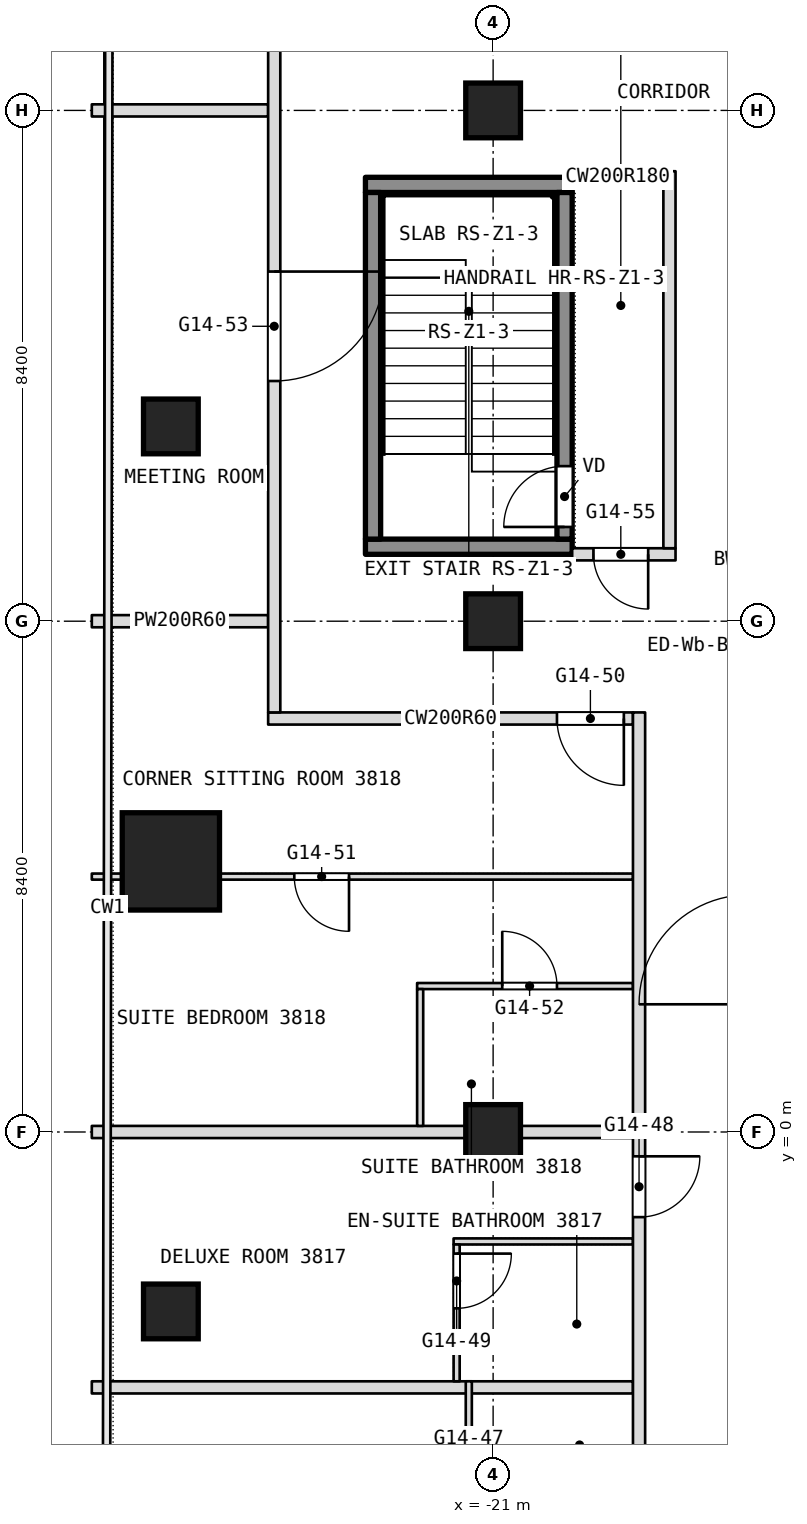
"""IFC4 building model, lengths in metres.
Left out: names, types, materials, properties, quantities, classifications, styles, units other than length and angle.
Written with IfcOpenShell. Run it as: python <this file> out.ifc"""

import sys

from ifc_helpers import new_model, si_unit, direction, frame, frame_2d, origin, origin_2d, place, context, subcontext, project, spatial, rectangle, extrude, element, fill, save


model = new_model("IFC4")
c1 = context("Model", 3, precision=1e-05, world=origin(), true_north=direction((0.0, 1.0)))
c2 = subcontext(c1, "Body", "Model", "MODEL_VIEW")
j1 = project(units=[si_unit("LENGTHUNIT", "METRE"), si_unit("PLANEANGLEUNIT", "RADIAN")], contexts=[c1])
p1 = place(None, origin())
s1 = spatial("IfcSite", under=j1, at=p1, CompositionType="ELEMENT")
p2 = place(p1, origin())
s2 = spatial("IfcBuilding", under=s1, at=p2, CompositionType="ELEMENT")
p3 = place(p2, frame((0.0, 0.0, 162.5)))
s3 = spatial("IfcBuildingStorey", under=s2, at=p3, CompositionType="ELEMENT", Elevation=162.5)
p4 = place(p3, frame((-26.3, 4.45, 0.0), z_axis=(0.0, 0.0, 1.0), x_axis=(1.0, 0.0, 0.0)))
e1 = element("IfcColumn", 1, at=p4, inside=s3, PredefinedType="COLUMN", context=c2, shape_type="SweptSolid", body=[
    extrude(rectangle(XDim=1.6, YDim=1.6, at=origin_2d()), origin(), (0.0, 0.0, 1.0), 3.6),
])
for number, where, z_axis, x_axis in (
    (2, (-21.0, 0.0, 0.0), (0.0, 0.0, 1.0), (1.0, 0.0, 0.0)),
    (3, (-21.0, 8.4, 0.0), (0.0, 0.0, 1.0), (1.0, 0.0, 0.0)),
    (4, (-21.0, 16.8, 0.0), (0.0, 0.0, 1.0), (1.0, 0.0, 0.0)),
    (5, (-26.3, -2.951, 0.0), (0.0, 0.0, 1.0), (1.0, 0.0, 0.0)),
    (6, (-26.3, 11.603, 0.0), (0.0, 0.0, 1.0), (1.0, 0.0, 0.0)),
):
    element("IfcColumn", number, at=place(p3, frame(where, z_axis=z_axis, x_axis=x_axis)), inside=s3, PredefinedType="COLUMN", context=c2, shape_type="SweptSolid", body=[
        extrude(rectangle(XDim=0.9, YDim=0.9, at=origin_2d()), origin(), (0.0, 0.0, 1.0), 3.6),
    ])
p5 = place(p3, frame((-27.6, -4.2, 0.0), z_axis=(0.0, 0.0, 1.0), x_axis=(1.0, 0.0, 0.0)))
e7 = element("IfcWall", 7, at=p5, inside=s3, PredefinedType="PARTITIONING", context=c2, shape_type="SweptSolid", body=[
    extrude(rectangle(XDim=8.9, YDim=0.2, at=frame_2d((4.45, 0.0))), origin(), (0.0, 0.0, 1.0), 3.34),
])
p6 = place(p3, frame((-21.65, -1.8, 0.0), z_axis=(0.0, 0.0, 1.0), x_axis=(1.0, 0.0, 0.0)))
e8 = element("IfcWall", 8, at=p6, inside=s3, PredefinedType="PARTITIONING", context=c2, shape_type="SweptSolid", body=[
    extrude(rectangle(XDim=2.95, YDim=0.1, at=frame_2d((1.475, 0.0))), origin(), (0.0, 0.0, 1.0), 3.34),
])
p7 = place(p3, frame((-27.6, 0.0, 0.0), z_axis=(0.0, 0.0, 1.0), x_axis=(1.0, 0.0, 0.0)))
e9 = element("IfcWall", 9, at=p7, inside=s3, PredefinedType="PARTITIONING", context=c2, shape_type="SweptSolid", body=[
    extrude(rectangle(XDim=8.9, YDim=0.2, at=frame_2d((4.45, 0.0))), origin(), (0.0, 0.0, 1.0), 2.89),
])
p8 = place(p3, frame((-22.25, 2.4, 0.0), z_axis=(0.0, 0.0, 1.0), x_axis=(1.0, 0.0, 0.0)))
e10 = element("IfcWall", 10, at=p8, inside=s3, PredefinedType="PARTITIONING", context=c2, shape_type="SweptSolid", body=[
    extrude(rectangle(XDim=3.55, YDim=0.1, at=frame_2d((1.775, 0.0))), origin(), (0.0, 0.0, 1.0), 3.34),
])
p9 = place(p8, frame((1.4, 0.0, 0.0)))
e11 = element("IfcOpeningElement", 11, at=p9, cuts=e10, PredefinedType="OPENING", context=c2, shape_type="SweptSolid", body=[
    extrude(rectangle(XDim=0.9, YDim=2.1, at=frame_2d((0.45, 1.05))), frame((0.0, 0.05, 0.0), z_axis=(0.0, -1.0, 0.0), x_axis=(1.0, 0.0, 0.0)), (0.0, 0.0, 1.0), 0.1),
])
p10 = place(p3, frame((-27.6, 4.2, 0.0), z_axis=(0.0, 0.0, 1.0), x_axis=(1.0, 0.0, 0.0)))
e12 = element("IfcWall", 12, at=p10, inside=s3, PredefinedType="PARTITIONING", context=c2, shape_type="SweptSolid", body=[
    extrude(rectangle(XDim=0.5, YDim=0.1, at=frame_2d((0.25, 0.0))), origin(), (0.0, 0.0, 1.0), 3.34),
])
p11 = place(p3, frame((-25.5, 4.2, 0.0), z_axis=(0.0, 0.0, 1.0), x_axis=(1.0, 0.0, 0.0)))
e13 = element("IfcWall", 13, at=p11, inside=s3, PredefinedType="PARTITIONING", context=c2, shape_type="SweptSolid", body=[
    extrude(rectangle(XDim=6.8, YDim=0.1, at=frame_2d((3.4, 0.0))), origin(), (0.0, 0.0, 1.0), 3.34),
])
p12 = place(p11, frame((1.23, 0.0, 0.0)))
e14 = element("IfcOpeningElement", 14, at=p12, cuts=e13, PredefinedType="OPENING", context=c2, shape_type="SweptSolid", body=[
    extrude(rectangle(XDim=0.9, YDim=2.1, at=frame_2d((0.45, 1.05))), frame((0.0, 0.05, 0.0), z_axis=(0.0, -1.0, 0.0), x_axis=(1.0, 0.0, 0.0)), (0.0, 0.0, 1.0), 0.1),
])
p13 = place(p3, frame((-24.7, 6.8, 0.0), z_axis=(0.0, 0.0, 1.0), x_axis=(1.0, 0.0, 0.0)))
e15 = element("IfcWall", 15, at=p13, inside=s3, PredefinedType="PARTITIONING", context=c2, shape_type="SweptSolid", body=[
    extrude(rectangle(XDim=6.0, YDim=0.2, at=frame_2d((3.0, 0.0))), origin(), (0.0, 0.0, 1.0), 3.34),
])
p14 = place(p13, frame((4.75, 0.0, 0.0)))
e16 = element("IfcOpeningElement", 16, at=p14, cuts=e15, PredefinedType="OPENING", context=c2, shape_type="SweptSolid", body=[
    extrude(rectangle(XDim=1.1, YDim=2.1, at=frame_2d((0.55, 1.05))), frame((0.0, 0.1, 0.0), z_axis=(0.0, -1.0, 0.0), x_axis=(1.0, 0.0, 0.0)), (0.0, 0.0, 1.0), 0.2),
])
p15 = place(p3, frame((-27.6, 8.4, 0.0), z_axis=(0.0, 0.0, 1.0), x_axis=(1.0, 0.0, 0.0)))
e17 = element("IfcWall", 17, at=p15, inside=s3, PredefinedType="PARTITIONING", context=c2, shape_type="SweptSolid", body=[
    extrude(rectangle(XDim=2.9, YDim=0.2, at=frame_2d((1.45, 0.0))), origin(), (0.0, 0.0, 1.0), 2.89),
])
p16 = place(p3, frame((-19.7, 9.5, 0.0), z_axis=(0.0, 0.0, 1.0), x_axis=(1.0, 0.0, 0.0)))
e18 = element("IfcWall", 18, at=p16, inside=s3, PredefinedType="PARTITIONING", context=c2, shape_type="SweptSolid", body=[
    extrude(rectangle(XDim=1.7, YDim=0.2, at=frame_2d((0.85, 0.0))), origin(), (0.0, 0.0, 1.0), 3.34),
])
p17 = place(p16, frame((0.35, 0.0, 0.0)))
e19 = element("IfcOpeningElement", 19, at=p17, cuts=e18, PredefinedType="OPENING", context=c2, shape_type="SweptSolid", body=[
    extrude(rectangle(XDim=0.9, YDim=2.1, at=frame_2d((0.45, 1.05))), frame((0.0, 0.1, 0.0), z_axis=(0.0, -1.0, 0.0), x_axis=(1.0, 0.0, 0.0)), (0.0, 0.0, 1.0), 0.2),
])
p18 = place(p3, frame((-19.7, 15.7, 0.0), z_axis=(0.0, 0.0, 1.0), x_axis=(1.0, 0.0, 0.0)))
e20 = element("IfcWall", 20, at=p18, inside=s3, PredefinedType="PARTITIONING", context=c2, shape_type="SweptSolid", body=[
    extrude(rectangle(XDim=1.5, YDim=0.2, at=frame_2d((0.75, 0.0))), origin(), (0.0, 0.0, 1.0), 3.34),
])
p19 = place(p3, frame((-27.6, 16.8, 0.0), z_axis=(0.0, 0.0, 1.0), x_axis=(1.0, 0.0, 0.0)))
e21 = element("IfcWall", 21, at=p19, inside=s3, PredefinedType="PARTITIONING", context=c2, shape_type="SweptSolid", body=[
    extrude(rectangle(XDim=2.9, YDim=0.2, at=frame_2d((1.45, 0.0))), origin(), (0.0, 0.0, 1.0), 2.89),
])
p20 = place(p3, frame((-18.1, 9.6, 0.0), z_axis=(0.0, 0.0, 1.0), x_axis=(0.0, 1.0, 0.0)))
e22 = element("IfcWall", 22, at=p20, inside=s3, PredefinedType="PARTITIONING", context=c2, shape_type="SweptSolid", body=[
    extrude(rectangle(XDim=6.2, YDim=0.2, at=frame_2d((3.1, 0.0))), origin(), (0.0, 0.0, 1.0), 3.34),
])
p21 = place(p3, frame((-18.6, -21.708, 0.0), z_axis=(0.0, 0.0, 1.0), x_axis=(0.0, 1.0, 0.0)))
e23 = element("IfcWall", 23, at=p21, inside=s3, PredefinedType="PARTITIONING", context=c2, shape_type="SweptSolid", body=[
    extrude(rectangle(XDim=28.608, YDim=0.2, at=frame_2d((14.304, 0.0))), origin(), (0.0, 0.0, 1.0), 3.34),
])
p22 = place(p21, frame((2.204, 0.0, 0.0)))
e24 = element("IfcOpeningElement", 24, at=p22, cuts=e23, PredefinedType="OPENING", context=c2, shape_type="SweptSolid", body=[
    extrude(rectangle(XDim=1.0, YDim=2.1, at=frame_2d((0.5, 1.05))), frame((0.0, 0.1, 0.0), z_axis=(0.0, -1.0, 0.0), x_axis=(1.0, 0.0, 0.0)), (0.0, 0.0, 1.0), 0.2),
])
p23 = place(p21, frame((8.208, 0.0, 0.0)))
e25 = element("IfcOpeningElement", 25, at=p23, cuts=e23, PredefinedType="OPENING", context=c2, shape_type="SweptSolid", body=[
    extrude(rectangle(XDim=1.8, YDim=2.1, at=frame_2d((0.9, 1.05))), frame((0.0, 0.1, 0.0), z_axis=(0.0, -1.0, 0.0), x_axis=(1.0, 0.0, 0.0)), (0.0, 0.0, 1.0), 0.2),
])
p24 = place(p21, frame((13.708, 0.0, 0.0)))
e26 = element("IfcOpeningElement", 26, at=p24, cuts=e23, PredefinedType="OPENING", context=c2, shape_type="SweptSolid", body=[
    extrude(rectangle(XDim=1.0, YDim=2.1, at=frame_2d((0.5, 1.05))), frame((0.0, 0.1, 0.0), z_axis=(0.0, -1.0, 0.0), x_axis=(1.0, 0.0, 0.0)), (0.0, 0.0, 1.0), 0.2),
])
p25 = place(p21, frame((20.308, 0.0, 0.0)))
e27 = element("IfcOpeningElement", 27, at=p25, cuts=e23, PredefinedType="OPENING", context=c2, shape_type="SweptSolid", body=[
    extrude(rectangle(XDim=1.0, YDim=2.1, at=frame_2d((0.5, 1.05))), frame((0.0, 0.1, 0.0), z_axis=(0.0, -1.0, 0.0), x_axis=(1.0, 0.0, 0.0)), (0.0, 0.0, 1.0), 0.2),
])
p26 = place(p3, frame((-21.4, -6.65, 0.0), z_axis=(0.0, 0.0, 1.0), x_axis=(0.0, 1.0, 0.0)))
e28 = element("IfcWall", 28, at=p26, inside=s3, PredefinedType="PARTITIONING", context=c2, shape_type="SweptSolid", body=[
    extrude(rectangle(XDim=2.55, YDim=0.1, at=frame_2d((1.275, 0.0))), origin(), (0.0, 0.0, 1.0), 3.34),
])
p27 = place(p26, frame((0.15, 0.0, 0.0)))
e29 = element("IfcOpeningElement", 29, at=p27, cuts=e28, PredefinedType="OPENING", context=c2, shape_type="SweptSolid", body=[
    extrude(rectangle(XDim=0.9, YDim=2.1, at=frame_2d((0.45, 1.05))), frame((0.0, 0.05, 0.0), z_axis=(0.0, -1.0, 0.0), x_axis=(1.0, 0.0, 0.0)), (0.0, 0.0, 1.0), 0.1),
])
p28 = place(p3, frame((-21.6, -4.1, 0.0), z_axis=(0.0, 0.0, 1.0), x_axis=(0.0, 1.0, 0.0)))
e30 = element("IfcWall", 30, at=p28, inside=s3, PredefinedType="PARTITIONING", context=c2, shape_type="SweptSolid", body=[
    extrude(rectangle(XDim=2.25, YDim=0.1, at=frame_2d((1.125, 0.0))), origin(), (0.0, 0.0, 1.0), 3.34),
])
p29 = place(p28, frame((1.2, 0.0, 0.0)))
e31 = element("IfcOpeningElement", 31, at=p29, cuts=e30, PredefinedType="OPENING", context=c2, shape_type="SweptSolid", body=[
    extrude(rectangle(XDim=0.9, YDim=2.1, at=frame_2d((0.45, 1.05))), frame((0.0, 0.05, 0.0), z_axis=(0.0, -1.0, 0.0), x_axis=(1.0, 0.0, 0.0)), (0.0, 0.0, 1.0), 0.1),
])
p30 = place(p3, frame((-22.2, 0.1, 0.0), z_axis=(0.0, 0.0, 1.0), x_axis=(0.0, 1.0, 0.0)))
e32 = element("IfcWall", 32, at=p30, inside=s3, PredefinedType="PARTITIONING", context=c2, shape_type="SweptSolid", body=[
    extrude(rectangle(XDim=2.25, YDim=0.1, at=frame_2d((1.125, 0.0))), origin(), (0.0, 0.0, 1.0), 3.34),
])
p31 = place(p3, frame((-24.6, 6.9, 0.0), z_axis=(0.0, 0.0, 1.0), x_axis=(0.0, 1.0, 0.0)))
e33 = element("IfcWall", 33, at=p31, inside=s3, PredefinedType="PARTITIONING", context=c2, shape_type="SweptSolid", body=[
    extrude(rectangle(XDim=11.6, YDim=0.2, at=frame_2d((5.8, 0.0))), origin(), (0.0, 0.0, 1.0), 3.34),
])
p32 = place(p31, frame((5.45, 0.0, 0.0)))
e34 = element("IfcOpeningElement", 34, at=p32, cuts=e33, PredefinedType="OPENING", context=c2, shape_type="SweptSolid", body=[
    extrude(rectangle(XDim=1.8, YDim=2.1, at=frame_2d((0.9, 1.05))), frame((0.0, 0.1, 0.0), z_axis=(0.0, -1.0, 0.0), x_axis=(1.0, 0.0, 0.0)), (0.0, 0.0, 1.0), 0.2),
])
for number, where, z_axis, x_axis in (
    (35, (-23.1, 9.625, 0.1), (0.0, 0.0, 1.0), (1.0, 0.0, 0.0)),
    (36, (-23.1, 15.575, 0.1), (0.0, 0.0, 1.0), (1.0, 0.0, 0.0)),
):
    element("IfcWall", number, at=place(p3, frame(where, z_axis=z_axis, x_axis=x_axis)), inside=s3, PredefinedType="SHEAR", context=c2, shape_type="SweptSolid", body=[
        extrude(rectangle(XDim=3.4, YDim=0.25, at=frame_2d((1.7, 0.0))), origin(), (0.0, 0.0, 1.0), 3.6),
    ])
p33 = place(p3, frame((-22.975, 9.75, 0.1), z_axis=(0.0, 0.0, 1.0), x_axis=(0.0, 1.0, 0.0)))
e37 = element("IfcWall", 37, at=p33, inside=s3, PredefinedType="SHEAR", context=c2, shape_type="SweptSolid", body=[
    extrude(rectangle(XDim=5.7, YDim=0.25, at=frame_2d((2.85, 0.0))), origin(), (0.0, 0.0, 1.0), 3.6),
])
p34 = place(p3, frame((-19.825, 9.75, 0.1), z_axis=(0.0, 0.0, 1.0), x_axis=(0.0, 1.0, 0.0)))
e38 = element("IfcWall", 38, at=p34, inside=s3, PredefinedType="SHEAR", context=c2, shape_type="SweptSolid", body=[
    extrude(rectangle(XDim=5.7, YDim=0.25, at=frame_2d((2.85, 0.0))), origin(), (0.0, 0.0, 1.0), 3.6),
])
p35 = place(p34, frame((0.2, 0.0, 0.0)))
e39 = element("IfcOpeningElement", 39, at=p35, cuts=e38, PredefinedType="OPENING", context=c2, shape_type="SweptSolid", body=[
    extrude(rectangle(XDim=1.0, YDim=2.1, at=frame_2d((0.5, 1.05))), frame((0.0, 0.125, 0.0), z_axis=(0.0, -1.0, 0.0), x_axis=(1.0, 0.0, 0.0)), (0.0, 0.0, 1.0), 0.25),
])
p36 = place(p9, origin())
e40 = element("IfcDoor", 40, at=p36, inside=s3, OperationType="SINGLE_SWING_LEFT", PredefinedType="DOOR", context=c2, shape_type="SweptSolid", body=[
    extrude(rectangle(XDim=0.9, YDim=2.1, at=frame_2d((0.45, 1.05))), frame((0.0, 0.025, 0.0), z_axis=(0.0, -1.0, 0.0), x_axis=(1.0, 0.0, 0.0)), (0.0, 0.0, 1.0), 0.05),
])
fill(e11, e40)
p37 = place(p12, origin())
e41 = element("IfcDoor", 41, at=p37, inside=s3, OperationType="SINGLE_SWING_RIGHT", PredefinedType="DOOR", context=c2, shape_type="SweptSolid", body=[
    extrude(rectangle(XDim=0.9, YDim=2.1, at=frame_2d((0.45, 1.05))), frame((0.0, 0.025, 0.0), z_axis=(0.0, -1.0, 0.0), x_axis=(1.0, 0.0, 0.0)), (0.0, 0.0, 1.0), 0.05),
])
fill(e14, e41)
p38 = place(p14, origin())
e42 = element("IfcDoor", 42, at=p38, inside=s3, OperationType="SINGLE_SWING_LEFT", PredefinedType="DOOR", context=c2, shape_type="SweptSolid", body=[
    extrude(rectangle(XDim=1.1, YDim=2.1, at=frame_2d((0.55, 1.05))), frame((0.0, 0.025, 0.0), z_axis=(0.0, -1.0, 0.0), x_axis=(1.0, 0.0, 0.0)), (0.0, 0.0, 1.0), 0.05),
])
fill(e16, e42)
p39 = place(p17, origin())
e43 = element("IfcDoor", 43, at=p39, inside=s3, OperationType="SINGLE_SWING_RIGHT", PredefinedType="DOOR", context=c2, shape_type="SweptSolid", body=[
    extrude(rectangle(XDim=0.9, YDim=2.1, at=frame_2d((0.45, 1.05))), frame((0.0, 0.025, 0.0), z_axis=(0.0, -1.0, 0.0), x_axis=(1.0, 0.0, 0.0)), (0.0, 0.0, 1.0), 0.05),
])
fill(e19, e43)
p40 = place(p25, origin())
e44 = element("IfcDoor", 44, at=p40, inside=s3, OperationType="SINGLE_SWING_LEFT", PredefinedType="DOOR", context=c2, shape_type="SweptSolid", body=[
    extrude(rectangle(XDim=1.0, YDim=2.1, at=frame_2d((0.5, 1.05))), frame((0.0, 0.025, 0.0), z_axis=(0.0, -1.0, 0.0), x_axis=(1.0, 0.0, 0.0)), (0.0, 0.0, 1.0), 0.05),
])
fill(e27, e44)
p41 = place(p29, origin())
e45 = element("IfcDoor", 45, at=p41, inside=s3, OperationType="SINGLE_SWING_LEFT", PredefinedType="DOOR", context=c2, shape_type="SweptSolid", body=[
    extrude(rectangle(XDim=0.9, YDim=2.1, at=frame_2d((0.45, 1.05))), frame((0.0, 0.025, 0.0), z_axis=(0.0, -1.0, 0.0), x_axis=(1.0, 0.0, 0.0)), (0.0, 0.0, 1.0), 0.05),
])
fill(e31, e45)
p42 = place(p32, origin())
e46 = element("IfcDoor", 46, at=p42, inside=s3, OperationType="DOUBLE_DOOR_SINGLE_SWING", PredefinedType="DOOR", context=c2, shape_type="SweptSolid", body=[
    extrude(rectangle(XDim=1.8, YDim=2.1, at=frame_2d((0.9, 1.05))), frame((0.0, 0.025, 0.0), z_axis=(0.0, -1.0, 0.0), x_axis=(1.0, 0.0, 0.0)), (0.0, 0.0, 1.0), 0.05),
])
fill(e34, e46)
p43 = place(p35, origin())
e47 = element("IfcDoor", 47, at=p43, inside=s3, OperationType="SINGLE_SWING_LEFT", PredefinedType="DOOR", context=c2, shape_type="SweptSolid", body=[
    extrude(rectangle(XDim=1.0, YDim=2.1, at=frame_2d((0.5, 1.05))), frame((0.0, 0.025, 0.0), z_axis=(0.0, -1.0, 0.0), x_axis=(1.0, 0.0, 0.0)), (0.0, 0.0, 1.0), 0.05),
])
fill(e39, e47)
save(model, sys.argv[1])
